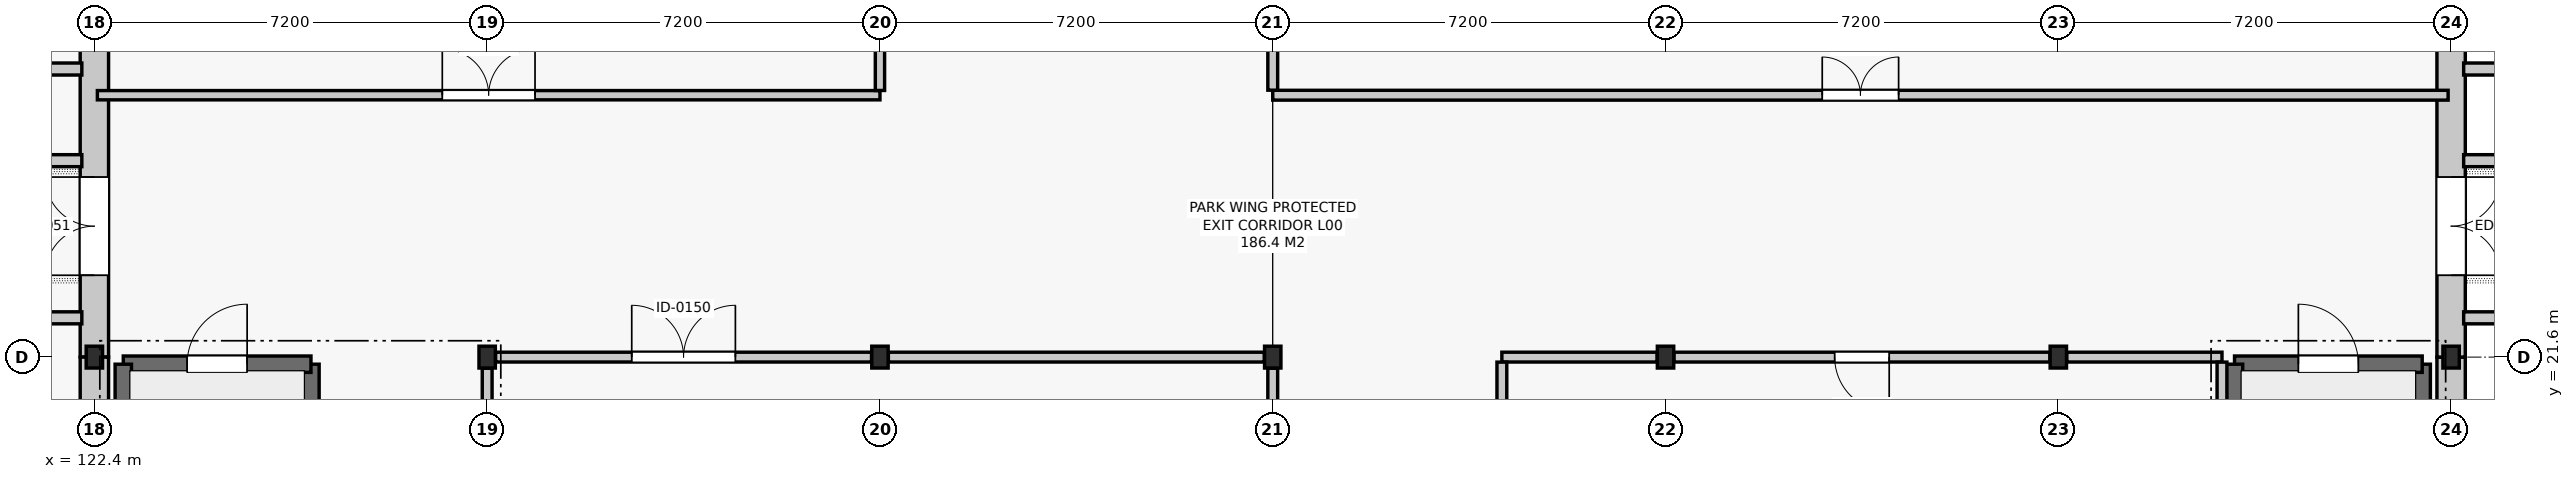
"""IFC4 building model, lengths in metres.
Left out: names, types, materials, properties, quantities, classifications, styles, units other than length and angle.
Written with IfcOpenShell. Run it as: python <this file> out.ifc"""

import sys

from ifc_helpers import new_model, si_unit, direction, frame, frame_2d, origin, origin_2d, place, context, subcontext, project, spatial, rectangle, i_section, extrude, element, fill, save


model = new_model("IFC4")
c1 = context("Model", 3, precision=1e-05, world=origin(), true_north=direction((0.0, 1.0)))
c2 = subcontext(c1, "Body", "Model", "MODEL_VIEW")
j1 = project(units=[si_unit("LENGTHUNIT", "METRE"), si_unit("PLANEANGLEUNIT", "RADIAN")], contexts=[c1])
p1 = place(None, origin())
s1 = spatial("IfcSite", under=j1, at=p1, CompositionType="ELEMENT")
p2 = place(p1, origin())
s2 = spatial("IfcBuilding", under=s1, at=p2, CompositionType="ELEMENT")
p3 = place(p2, origin())
s3 = spatial("IfcBuildingStorey", under=s2, at=p3, CompositionType="ELEMENT", Elevation=0.0)
for number, where, z_axis, x_axis in (
    (1, (122.4, 21.6, 0.0), (0.0, 0.0, 1.0), (1.0, 0.0, 0.0)),
    (2, (129.6, 21.6, 0.0), (0.0, 0.0, 1.0), (1.0, 0.0, 0.0)),
    (3, (136.8, 21.6, 0.0), (0.0, 0.0, 1.0), (1.0, 0.0, 0.0)),
    (4, (144.0, 21.6, 0.0), (0.0, 0.0, 1.0), (1.0, 0.0, 0.0)),
    (5, (151.2, 21.6, 0.0), (0.0, 0.0, 1.0), (1.0, 0.0, 0.0)),
    (6, (158.4, 21.6, 0.0), (0.0, 0.0, 1.0), (1.0, 0.0, 0.0)),
    (7, (165.6, 21.6, 0.0), (0.0, 0.0, 1.0), (1.0, 0.0, 0.0)),
):
    element("IfcColumn", number, at=place(p3, frame(where, z_axis=z_axis, x_axis=x_axis)), inside=s3, PredefinedType="COLUMN", context=c2, shape_type="SweptSolid", body=[
        extrude(i_section(OverallWidth=0.3, OverallDepth=0.4, WebThickness=0.013, FlangeThickness=0.024, FilletRadius=0.027, at=origin_2d()), origin(), (0.0, 0.0, 1.0), 5.4),
    ])
p4 = place(p3, frame((165.6, 14.4, 0.0), z_axis=(0.0, 0.0, 1.0), x_axis=(0.0, 1.0, 0.0)))
e8 = element("IfcWall", 8, at=p4, inside=s3, PredefinedType="SOLIDWALL", context=c2, shape_type="SweptSolid", body=[
    extrude(rectangle(XDim=7.2, YDim=0.52, at=frame_2d((3.6, 0.0))), origin(), (0.0, 0.0, 1.0), 4.4),
])
p5 = place(p3, frame((165.6, 21.6, 0.0), z_axis=(0.0, 0.0, 1.0), x_axis=(0.0, 1.0, 0.0)))
e9 = element("IfcWall", 9, at=p5, inside=s3, PredefinedType="SOLIDWALL", context=c2, shape_type="SweptSolid", body=[
    extrude(rectangle(XDim=7.2, YDim=0.52, at=frame_2d((3.6, 0.0))), origin(), (0.0, 0.0, 1.0), 4.4),
])
p6 = place(p5, frame((1.5, 0.0, 0.0)))
e10 = element("IfcOpeningElement", 10, at=p6, cuts=e9, PredefinedType="OPENING", context=c2, shape_type="SweptSolid", body=[
    extrude(rectangle(XDim=1.8, YDim=2.2, at=frame_2d((0.9, 1.1))), frame((0.0, 0.272, 0.0), z_axis=(0.0, -1.0, 0.0), x_axis=(1.0, 0.0, 0.0)), (0.0, 0.0, 1.0), 0.544),
])
p7 = place(p3, frame((122.4, 28.8, 0.0), z_axis=(0.0, 0.0, 1.0), x_axis=(0.0, -1.0, 0.0)))
e11 = element("IfcWall", 11, at=p7, inside=s3, PredefinedType="SOLIDWALL", context=c2, shape_type="SweptSolid", body=[
    extrude(rectangle(XDim=7.2, YDim=0.52, at=frame_2d((3.6, 0.0))), origin(), (0.0, 0.0, 1.0), 4.4),
])
p8 = place(p7, frame((3.9, 0.0, 0.0)))
e12 = element("IfcOpeningElement", 12, at=p8, cuts=e11, PredefinedType="OPENING", context=c2, shape_type="SweptSolid", body=[
    extrude(rectangle(XDim=1.8, YDim=2.2, at=frame_2d((0.9, 1.1))), frame((0.0, 0.272, 0.0), z_axis=(0.0, -1.0, 0.0), x_axis=(1.0, 0.0, 0.0)), (0.0, 0.0, 1.0), 0.544),
])
p9 = place(p3, frame((122.4, 21.6, 0.0), z_axis=(0.0, 0.0, 1.0), x_axis=(0.0, -1.0, 0.0)))
e13 = element("IfcWall", 13, at=p9, inside=s3, PredefinedType="SOLIDWALL", context=c2, shape_type="SweptSolid", body=[
    extrude(rectangle(XDim=7.2, YDim=0.52, at=frame_2d((3.6, 0.0))), origin(), (0.0, 0.0, 1.0), 4.4),
])
p10 = place(p9, frame((2.5, 0.0, 0.9)))
e14 = element("IfcOpeningElement", 14, at=p10, cuts=e13, PredefinedType="OPENING", context=c2, shape_type="SweptSolid", body=[
    extrude(rectangle(XDim=2.2, YDim=2.25, at=frame_2d((1.1, 1.125))), frame((0.0, 0.272, 0.0), z_axis=(0.0, -1.0, 0.0), x_axis=(1.0, 0.0, 0.0)), (0.0, 0.0, 1.0), 0.544),
])
p11 = place(p3, frame((126.37, 14.43, 0.0), z_axis=(0.0, 0.0, 1.0), x_axis=(0.0, 1.0, 0.0)))
e15 = element("IfcWall", 15, at=p11, inside=s3, PredefinedType="SHEAR", context=c2, shape_type="SweptSolid", body=[
    extrude(rectangle(XDim=7.04, YDim=0.3, at=frame_2d((3.52, 0.0))), origin(), (0.0, 0.0, 1.0), 5.12),
])
p12 = place(p3, frame((126.37, 21.47, 0.0), z_axis=(0.0, 0.0, 1.0), x_axis=(-1.0, 0.0, 0.0)))
e16 = element("IfcWall", 16, at=p12, inside=s3, PredefinedType="SHEAR", context=c2, shape_type="SweptSolid", body=[
    extrude(rectangle(XDim=3.44, YDim=0.3, at=frame_2d((1.72, 0.0))), origin(), (0.0, 0.0, 1.0), 5.12),
])
p13 = place(p12, frame((1.17, 0.0, 0.0)))
e17 = element("IfcOpeningElement", 17, at=p13, cuts=e16, PredefinedType="OPENING", context=c2, shape_type="SweptSolid", body=[
    extrude(rectangle(XDim=1.1, YDim=2.15, at=frame_2d((0.55, 1.075))), frame((0.0, 0.162, 0.0), z_axis=(0.0, -1.0, 0.0), x_axis=(1.0, 0.0, 0.0)), (0.0, 0.0, 1.0), 0.324),
])
for number, where, z_axis, x_axis in (
    (18, (122.93, 21.47, 0.0), (0.0, 0.0, 1.0), (0.0, -1.0, 0.0)),
    (19, (165.07, 14.43, 0.0), (0.0, 0.0, 1.0), (0.0, 1.0, 0.0)),
):
    element("IfcWall", number, at=place(p3, frame(where, z_axis=z_axis, x_axis=x_axis)), inside=s3, PredefinedType="SHEAR", context=c2, shape_type="SweptSolid", body=[
        extrude(rectangle(XDim=7.04, YDim=0.3, at=frame_2d((3.52, 0.0))), origin(), (0.0, 0.0, 1.0), 5.12),
    ])
p14 = place(p3, frame((165.07, 21.47, 0.0), z_axis=(0.0, 0.0, 1.0), x_axis=(-1.0, 0.0, 0.0)))
e20 = element("IfcWall", 20, at=p14, inside=s3, PredefinedType="SHEAR", context=c2, shape_type="SweptSolid", body=[
    extrude(rectangle(XDim=3.44, YDim=0.3, at=frame_2d((1.72, 0.0))), origin(), (0.0, 0.0, 1.0), 5.12),
])
p15 = place(p14, frame((1.17, 0.0, 0.0)))
e21 = element("IfcOpeningElement", 21, at=p15, cuts=e20, PredefinedType="OPENING", context=c2, shape_type="SweptSolid", body=[
    extrude(rectangle(XDim=1.1, YDim=2.15, at=frame_2d((0.55, 1.075))), frame((0.0, 0.162, 0.0), z_axis=(0.0, -1.0, 0.0), x_axis=(1.0, 0.0, 0.0)), (0.0, 0.0, 1.0), 0.324),
])
p16 = place(p3, frame((161.63, 21.47, 0.0), z_axis=(0.0, 0.0, 1.0), x_axis=(0.0, -1.0, 0.0)))
e22 = element("IfcWall", 22, at=p16, inside=s3, PredefinedType="SHEAR", context=c2, shape_type="SweptSolid", body=[
    extrude(rectangle(XDim=7.04, YDim=0.3, at=frame_2d((3.52, 0.0))), origin(), (0.0, 0.0, 1.0), 5.12),
])
p17 = place(p3, frame((148.2, 21.6, 0.0), z_axis=(0.0, 0.0, 1.0), x_axis=(1.0, 0.0, 0.0)))
e23 = element("IfcWall", 23, at=p17, inside=s3, PredefinedType="PARTITIONING", context=c2, shape_type="SweptSolid", body=[
    extrude(rectangle(XDim=2.846, YDim=0.18, at=frame_2d((1.423, 0.0))), origin(), (0.0, 0.0, 1.0), 4.715),
])
p18 = place(p3, frame((151.354, 21.6, 0.0), z_axis=(0.0, 0.0, 1.0), x_axis=(1.0, 0.0, 0.0)))
e24 = element("IfcWall", 24, at=p18, inside=s3, PredefinedType="PARTITIONING", context=c2, shape_type="SweptSolid", body=[
    extrude(rectangle(XDim=6.892, YDim=0.18, at=frame_2d((3.446, 0.0))), origin(), (0.0, 0.0, 1.0), 4.715),
])
p19 = place(p18, frame((2.946, 0.0, 0.0)))
e25 = element("IfcOpeningElement", 25, at=p19, cuts=e24, PredefinedType="OPENING", context=c2, shape_type="SweptSolid", body=[
    extrude(rectangle(XDim=1.0, YDim=2.15, at=frame_2d((0.5, 1.075))), frame((0.0, 0.102, 0.0), z_axis=(0.0, -1.0, 0.0), x_axis=(1.0, 0.0, 0.0)), (0.0, 0.0, 1.0), 0.204),
])
p20 = place(p3, frame((158.554, 21.6, 0.0), z_axis=(0.0, 0.0, 1.0), x_axis=(1.0, 0.0, 0.0)))
e26 = element("IfcWall", 26, at=p20, inside=s3, PredefinedType="PARTITIONING", context=c2, shape_type="SweptSolid", body=[
    extrude(rectangle(XDim=2.846, YDim=0.18, at=frame_2d((1.423, 0.0))), origin(), (0.0, 0.0, 1.0), 4.715),
])
p21 = place(p3, frame((144.0, 26.4, 0.0), z_axis=(0.0, 0.0, 1.0), x_axis=(1.0, 0.0, 0.0)))
e27 = element("IfcWall", 27, at=p21, inside=s3, PredefinedType="PARTITIONING", context=c2, shape_type="SweptSolid", body=[
    extrude(rectangle(XDim=21.545, YDim=0.18, at=frame_2d((10.772, 0.0))), origin(), (0.0, 0.0, 1.0), 4.555),
])
p22 = place(p21, frame((10.073, 0.0, 0.0)))
e28 = element("IfcOpeningElement", 28, at=p22, cuts=e27, PredefinedType="OPENING", context=c2, shape_type="SweptSolid", body=[
    extrude(rectangle(XDim=1.4, YDim=2.2, at=frame_2d((0.7, 1.1))), frame((0.0, 0.102, 0.0), z_axis=(0.0, -1.0, 0.0), x_axis=(1.0, 0.0, 0.0)), (0.0, 0.0, 1.0), 0.204),
])
p23 = place(p3, frame((129.754, 21.6, 0.0), z_axis=(0.0, 0.0, 1.0), x_axis=(1.0, 0.0, 0.0)))
e29 = element("IfcWall", 29, at=p23, inside=s3, PredefinedType="PARTITIONING", context=c2, shape_type="SweptSolid", body=[
    extrude(rectangle(XDim=6.892, YDim=0.18, at=frame_2d((3.446, 0.0))), origin(), (0.0, 0.0, 1.0), 5.105),
])
p24 = place(p23, frame((2.496, 0.0, 0.0)))
e30 = element("IfcOpeningElement", 30, at=p24, cuts=e29, PredefinedType="OPENING", context=c2, shape_type="SweptSolid", body=[
    extrude(rectangle(XDim=1.9, YDim=2.35, at=frame_2d((0.95, 1.175))), frame((0.0, 0.102, 0.0), z_axis=(0.0, -1.0, 0.0), x_axis=(1.0, 0.0, 0.0)), (0.0, 0.0, 1.0), 0.204),
])
p25 = place(p3, frame((136.954, 21.6, 0.0), z_axis=(0.0, 0.0, 1.0), x_axis=(1.0, 0.0, 0.0)))
e31 = element("IfcWall", 31, at=p25, inside=s3, PredefinedType="PARTITIONING", context=c2, shape_type="SweptSolid", body=[
    extrude(rectangle(XDim=6.892, YDim=0.18, at=frame_2d((3.446, 0.0))), origin(), (0.0, 0.0, 1.0), 5.105),
])
p26 = place(p3, frame((122.455, 26.4, 0.0), z_axis=(0.0, 0.0, 1.0), x_axis=(1.0, 0.0, 0.0)))
e32 = element("IfcWall", 32, at=p26, inside=s3, PredefinedType="PARTITIONING", context=c2, shape_type="SweptSolid", body=[
    extrude(rectangle(XDim=14.345, YDim=0.17, at=frame_2d((7.172, 0.0))), origin(), (0.0, 0.0, 1.0), 4.555),
])
p27 = place(p26, frame((6.323, 0.0, 0.0)))
e33 = element("IfcOpeningElement", 33, at=p27, cuts=e32, PredefinedType="OPENING", context=c2, shape_type="SweptSolid", body=[
    extrude(rectangle(XDim=1.7, YDim=2.3, at=frame_2d((0.85, 1.15))), frame((0.0, 0.097, 0.0), z_axis=(0.0, -1.0, 0.0), x_axis=(1.0, 0.0, 0.0)), (0.0, 0.0, 1.0), 0.194),
])
p28 = place(p3, frame((148.2, 18.077, 0.0), z_axis=(0.0, 0.0, 1.0), x_axis=(0.0, 1.0, 0.0)))
e34 = element("IfcWall", 34, at=p28, inside=s3, PredefinedType="PARTITIONING", context=c2, shape_type="SweptSolid", body=[
    extrude(rectangle(XDim=3.431, YDim=0.18, at=frame_2d((1.716, 0.0))), origin(), (0.0, 0.0, 1.0), 4.715),
])
p29 = place(p3, frame((161.4, 18.092, 0.0), z_axis=(0.0, 0.0, 1.0), x_axis=(0.0, 1.0, 0.0)))
e35 = element("IfcWall", 35, at=p29, inside=s3, PredefinedType="PARTITIONING", context=c2, shape_type="SweptSolid", body=[
    extrude(rectangle(XDim=3.416, YDim=0.18, at=frame_2d((1.708, 0.0))), origin(), (0.0, 0.0, 1.0), 4.715),
])
p30 = place(p3, frame((144.0, 26.492, 0.0), z_axis=(0.0, 0.0, 1.0), x_axis=(0.0, 1.0, 0.0)))
e36 = element("IfcWall", 36, at=p30, inside=s3, PredefinedType="PARTITIONING", context=c2, shape_type="SweptSolid", body=[
    extrude(rectangle(XDim=2.104, YDim=0.18, at=frame_2d((1.052, 0.0))), origin(), (0.0, 0.0, 1.0), 4.665),
])
p31 = place(p3, frame((129.6, 14.604, 0.0), z_axis=(0.0, 0.0, 1.0), x_axis=(0.0, 1.0, 0.0)))
e37 = element("IfcWall", 37, at=p31, inside=s3, PredefinedType="PARTITIONING", context=c2, shape_type="SweptSolid", body=[
    extrude(rectangle(XDim=6.792, YDim=0.18, at=frame_2d((3.396, 0.0))), origin(), (0.0, 0.0, 1.0), 5.105),
])
p32 = place(p3, frame((144.0, 14.604, 0.0), z_axis=(0.0, 0.0, 1.0), x_axis=(0.0, 1.0, 0.0)))
e38 = element("IfcWall", 38, at=p32, inside=s3, PredefinedType="PARTITIONING", context=c2, shape_type="SweptSolid", body=[
    extrude(rectangle(XDim=6.792, YDim=0.18, at=frame_2d((3.396, 0.0))), origin(), (0.0, 0.0, 1.0), 5.105),
])
p33 = place(p32, frame((2.446, 0.0, 0.0)))
e39 = element("IfcOpeningElement", 39, at=p33, cuts=e38, PredefinedType="OPENING", context=c2, shape_type="SweptSolid", body=[
    extrude(rectangle(XDim=1.9, YDim=2.35, at=frame_2d((0.95, 1.175))), frame((0.0, 0.102, 0.0), z_axis=(0.0, -1.0, 0.0), x_axis=(1.0, 0.0, 0.0)), (0.0, 0.0, 1.0), 0.204),
])
p34 = place(p3, frame((136.8, 26.487, 0.0), z_axis=(0.0, 0.0, 1.0), x_axis=(0.0, 1.0, 0.0)))
e40 = element("IfcWall", 40, at=p34, inside=s3, PredefinedType="PARTITIONING", context=c2, shape_type="SweptSolid", body=[
    extrude(rectangle(XDim=2.109, YDim=0.17, at=frame_2d((1.054, 0.0))), origin(), (0.0, 0.0, 1.0), 4.665),
])
p35 = place(p6, frame((1.8, 0.0, 0.0), z_axis=(0.0, 0.0, 1.0), x_axis=(-1.0, 0.0, 0.0)))
e41 = element("IfcDoor", 41, at=p35, inside=s3, OperationType="DOUBLE_DOOR_SINGLE_SWING", PredefinedType="DOOR", context=c2, shape_type="SweptSolid", body=[
    extrude(rectangle(XDim=1.8, YDim=2.2, at=frame_2d((0.9, 1.1))), frame((0.0, 0.025, 0.0), z_axis=(0.0, -1.0, 0.0), x_axis=(1.0, 0.0, 0.0)), (0.0, 0.0, 1.0), 0.05),
])
fill(e10, e41)
p36 = place(p8, frame((1.8, 0.0, 0.0), z_axis=(0.0, 0.0, 1.0), x_axis=(-1.0, 0.0, 0.0)))
e42 = element("IfcDoor", 42, at=p36, inside=s3, OperationType="DOUBLE_DOOR_SINGLE_SWING", PredefinedType="DOOR", context=c2, shape_type="SweptSolid", body=[
    extrude(rectangle(XDim=1.8, YDim=2.2, at=frame_2d((0.9, 1.1))), frame((0.0, 0.025, 0.0), z_axis=(0.0, -1.0, 0.0), x_axis=(1.0, 0.0, 0.0)), (0.0, 0.0, 1.0), 0.05),
])
fill(e12, e42)
p37 = place(p13, frame((1.1, 0.0, 0.0), z_axis=(0.0, 0.0, 1.0), x_axis=(-1.0, 0.0, 0.0)))
e43 = element("IfcDoor", 43, at=p37, inside=s3, OperationType="SINGLE_SWING_RIGHT", PredefinedType="DOOR", context=c2, shape_type="SweptSolid", body=[
    extrude(rectangle(XDim=1.1, YDim=2.15, at=frame_2d((0.55, 1.075))), frame((0.0, 0.025, 0.0), z_axis=(0.0, -1.0, 0.0), x_axis=(1.0, 0.0, 0.0)), (0.0, 0.0, 1.0), 0.05),
])
fill(e17, e43)
p38 = place(p15, frame((1.1, 0.0, 0.0), z_axis=(0.0, 0.0, 1.0), x_axis=(-1.0, 0.0, 0.0)))
e44 = element("IfcDoor", 44, at=p38, inside=s3, OperationType="SINGLE_SWING_LEFT", PredefinedType="DOOR", context=c2, shape_type="SweptSolid", body=[
    extrude(rectangle(XDim=1.1, YDim=2.15, at=frame_2d((0.55, 1.075))), frame((0.0, 0.025, 0.0), z_axis=(0.0, -1.0, 0.0), x_axis=(1.0, 0.0, 0.0)), (0.0, 0.0, 1.0), 0.05),
])
fill(e21, e44)
p39 = place(p19, frame((1.0, 0.0, 0.0), z_axis=(0.0, 0.0, 1.0), x_axis=(-1.0, 0.0, 0.0)))
e45 = element("IfcDoor", 45, at=p39, inside=s3, OperationType="SINGLE_SWING_LEFT", PredefinedType="DOOR", context=c2, shape_type="SweptSolid", body=[
    extrude(rectangle(XDim=1.0, YDim=2.15, at=frame_2d((0.5, 1.075))), frame((0.0, 0.025, 0.0), z_axis=(0.0, -1.0, 0.0), x_axis=(1.0, 0.0, 0.0)), (0.0, 0.0, 1.0), 0.05),
])
fill(e25, e45)
p40 = place(p22, origin())
e46 = element("IfcDoor", 46, at=p40, inside=s3, OperationType="DOUBLE_DOOR_SINGLE_SWING", PredefinedType="DOOR", context=c2, shape_type="SweptSolid", body=[
    extrude(rectangle(XDim=1.4, YDim=2.2, at=frame_2d((0.7, 1.1))), frame((0.0, 0.025, 0.0), z_axis=(0.0, -1.0, 0.0), x_axis=(1.0, 0.0, 0.0)), (0.0, 0.0, 1.0), 0.05),
])
fill(e28, e46)
p41 = place(p24, origin())
e47 = element("IfcDoor", 47, at=p41, inside=s3, OperationType="DOUBLE_DOOR_SINGLE_SWING", PredefinedType="DOOR", context=c2, shape_type="SweptSolid", body=[
    extrude(rectangle(XDim=1.9, YDim=2.35, at=frame_2d((0.95, 1.175))), frame((0.0, 0.025, 0.0), z_axis=(0.0, -1.0, 0.0), x_axis=(1.0, 0.0, 0.0)), (0.0, 0.0, 1.0), 0.05),
])
fill(e30, e47)
p42 = place(p27, origin())
e48 = element("IfcDoor", 48, at=p42, inside=s3, OperationType="DOUBLE_DOOR_SINGLE_SWING", PredefinedType="DOOR", context=c2, shape_type="SweptSolid", body=[
    extrude(rectangle(XDim=1.7, YDim=2.3, at=frame_2d((0.85, 1.15))), frame((0.0, 0.025, 0.0), z_axis=(0.0, -1.0, 0.0), x_axis=(1.0, 0.0, 0.0)), (0.0, 0.0, 1.0), 0.05),
])
fill(e33, e48)
save(model, sys.argv[1])
